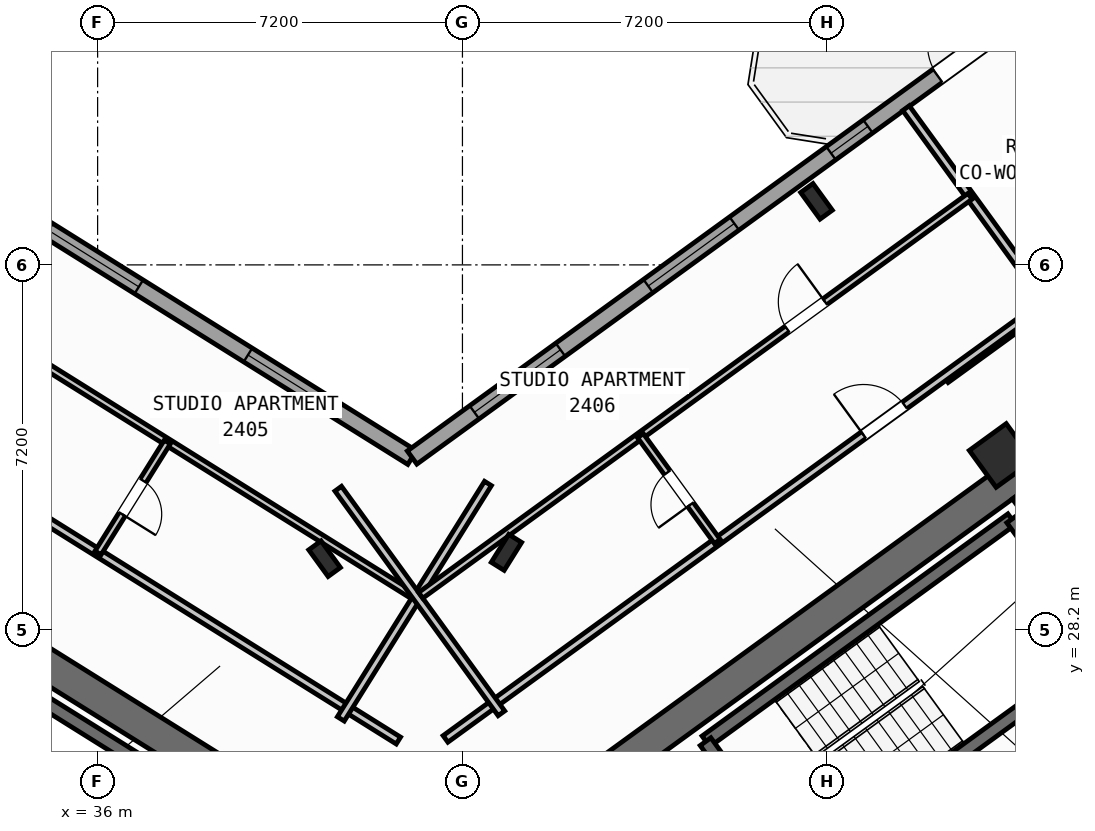
"""IFC4 building model, lengths in metres.
Left out: names, types, materials, properties, quantities, classifications, styles, units other than length and angle.
Written with IfcOpenShell. Run it as: python <this file> out.ifc"""

import sys

from ifc_helpers import new_model, si_unit, direction, frame, frame_2d, origin, origin_2d, place, context, subcontext, project, spatial, rectangle, hollow_rectangle, i_section, extrude, source, transform, mapped, element, fill, save


model = new_model("IFC4")
c1 = context("Model", 3, precision=1e-05, world=origin(), true_north=direction((0.0, 1.0)))
c2 = subcontext(c1, "Body", "Model", "MODEL_VIEW")
j1 = project(units=[si_unit("LENGTHUNIT", "METRE"), si_unit("PLANEANGLEUNIT", "RADIAN")], contexts=[c1])
p1 = place(None, origin())
s1 = spatial("IfcSite", under=j1, at=p1, CompositionType="ELEMENT")
p2 = place(p1, origin())
s2 = spatial("IfcBuilding", under=s1, at=p2, CompositionType="ELEMENT")
p3 = place(p2, frame((0.0, 0.0, 97.2)))
s3 = spatial("IfcBuildingStorey", under=s2, at=p3, CompositionType="ELEMENT", Elevation=97.2)
p4 = place(p3, frame((40.615, 23.983, 0.0), z_axis=(0.0, 0.0, 1.0), x_axis=(-0.848045953968, 0.529922692436, 0.0)))
e1 = element("IfcWall", 1, at=p4, inside=s3, PredefinedType="SHEAR", context=c2, shape_type="SweptSolid", body=[
    extrude(rectangle(XDim=13.24, YDim=0.65, at=frame_2d((6.62, 0.0))), origin(), (0.0, 0.0, 1.0), 3.32),
])
p5 = place(p3, frame((44.325, 24.113, 0.0), z_axis=(0.0, 0.0, 1.0), x_axis=(0.809012664862, 0.58779121131, 0.0)))
e2 = element("IfcWall", 2, at=p5, inside=s3, PredefinedType="SHEAR", context=c2, shape_type="SweptSolid", body=[
    extrude(rectangle(XDim=12.44, YDim=0.65, at=frame_2d((6.22, 0.0))), origin(), (0.0, 0.0, 1.0), 3.32),
])
p6 = place(p3, frame((58.064, 25.813, 0.0), z_axis=(0.0, 0.0, 1.0), x_axis=(-0.58777996584, 0.809020835181, 0.0)))
e3 = element("IfcWall", 3, at=p6, inside=s3, PredefinedType="SHEAR", context=c2, shape_type="SweptSolid", body=[
    extrude(rectangle(XDim=6.375, YDim=0.65, at=frame_2d((3.188, 0.0))), origin(), (0.0, 0.0, 1.0), 3.32),
])
m1 = source(origin(), c2, "Body", "SweptSolid", [
    extrude(i_section(OverallWidth=0.3, OverallDepth=0.65, WebThickness=0.016, FlangeThickness=0.031, at=origin_2d()), origin(), (0.0, 0.0, 1.0), 3.6),
])
for number, where, z_axis, x_axis in (
    (4, (44.068, 29.726, 0.0), (0.0, 0.0, 1.0), (-0.848, 0.53, 0.0)),
    (5, (40.479, 29.601, 0.0), (0.0, 0.0, 1.0), (0.809, 0.588, 0.0)),
):
    element("IfcColumn", number, at=place(p3, frame(where, z_axis=z_axis, x_axis=x_axis)), inside=s3, PredefinedType="COLUMN", context=c2, shape_type="MappedRepresentation", body=[
        mapped(m1, transform((0.0, 0.0, 0.0), scale=1.0)),
    ])
m2 = source(origin(), c2, "Body", "SweptSolid", [
    extrude(hollow_rectangle(XDim=0.9, YDim=0.9, WallThickness=0.036, at=origin_2d()), origin(), (0.0, 0.0, 1.0), 3.6),
])
p7 = place(p3, frame((53.832, 31.638, 0.0), z_axis=(0.0, 0.0, 1.0), x_axis=(0.809016994375, 0.587785252292, 0.0)))
e6 = element("IfcColumn", 6, at=p7, inside=s3, PredefinedType="COLUMN", context=c2, shape_type="MappedRepresentation", body=[
    mapped(m2, transform((0.0, 0.0, 0.0), scale=1.0)),
])
p8 = place(p3, frame((50.188, 36.654, 0.0), z_axis=(0.0, 0.0, 1.0), x_axis=(0.809016994375, 0.587785252292, 0.0)))
e7 = element("IfcColumn", 7, at=p8, inside=s3, PredefinedType="COLUMN", context=c2, shape_type="MappedRepresentation", body=[
    mapped(m1, transform((0.0, 0.0, 0.0), scale=1.0)),
])
p9 = place(p3, frame((17.424, 47.083, 0.0), z_axis=(0.0, 0.0, 1.0), x_axis=(0.848049927979, -0.529916332693, 0.0)))
e8 = element("IfcWall", 8, at=p9, inside=s3, PredefinedType="STANDARD", context=c2, shape_type="SweptSolid", body=[
    extrude(rectangle(XDim=29.223, YDim=0.32, at=frame_2d((14.612, 0.0))), origin(), (0.0, 0.0, 1.0), 3.32),
])
p10 = place(p9, frame((3.745, 0.0, 0.0)))
e9 = element("IfcOpeningElement", 9, at=p10, cuts=e8, PredefinedType="OPENING", context=c2, shape_type="SweptSolid", body=[
    extrude(rectangle(XDim=1.05, YDim=2.15, at=frame_2d((0.525, 1.075))), frame((0.0, 0.17, 0.0), z_axis=(0.0, -1.0, 0.0), x_axis=(1.0, 0.0, 0.0)), (0.0, 0.0, 1.0), 0.34),
])
p11 = place(p9, frame((0.699, 0.0, 0.95)))
e10 = element("IfcOpeningElement", 10, at=p11, cuts=e8, PredefinedType="OPENING", context=c2, shape_type="SweptSolid", body=[
    extrude(rectangle(XDim=1.2, YDim=1.4, at=frame_2d((0.6, 0.7))), frame((0.0, 0.17, 0.0), z_axis=(0.0, -1.0, 0.0), x_axis=(1.0, 0.0, 0.0)), (0.0, 0.0, 1.0), 0.34),
])
p12 = place(p9, frame((6.951, 0.0, 1.0)))
e11 = element("IfcOpeningElement", 11, at=p12, cuts=e8, PredefinedType="OPENING", context=c2, shape_type="SweptSolid", body=[
    extrude(rectangle(XDim=0.9, YDim=1.25, at=frame_2d((0.45, 0.625))), frame((0.0, 0.17, 0.0), z_axis=(0.0, -1.0, 0.0), x_axis=(1.0, 0.0, 0.0)), (0.0, 0.0, 1.0), 0.34),
])
p13 = place(p9, frame((9.841, 0.0, 0.85)))
e12 = element("IfcOpeningElement", 12, at=p13, cuts=e8, PredefinedType="OPENING", context=c2, shape_type="SweptSolid", body=[
    extrude(rectangle(XDim=1.5, YDim=1.5, at=frame_2d((0.75, 0.75))), frame((0.0, 0.17, 0.0), z_axis=(0.0, -1.0, 0.0), x_axis=(1.0, 0.0, 0.0)), (0.0, 0.0, 1.0), 0.34),
])
p14 = place(p9, frame((13.889, 0.0, 0.95)))
e13 = element("IfcOpeningElement", 13, at=p14, cuts=e8, PredefinedType="OPENING", context=c2, shape_type="SweptSolid", body=[
    extrude(rectangle(XDim=1.2, YDim=1.4, at=frame_2d((0.6, 0.7))), frame((0.0, 0.17, 0.0), z_axis=(0.0, -1.0, 0.0), x_axis=(1.0, 0.0, 0.0)), (0.0, 0.0, 1.0), 0.34),
])
p15 = place(p9, frame((17.254, 0.0, 1.0)))
e14 = element("IfcOpeningElement", 14, at=p15, cuts=e8, PredefinedType="OPENING", context=c2, shape_type="SweptSolid", body=[
    extrude(rectangle(XDim=0.9, YDim=1.25, at=frame_2d((0.45, 0.625))), frame((0.0, 0.17, 0.0), z_axis=(0.0, -1.0, 0.0), x_axis=(1.0, 0.0, 0.0)), (0.0, 0.0, 1.0), 0.34),
])
p16 = place(p9, frame((20.764, 0.0, 0.8)))
e15 = element("IfcOpeningElement", 15, at=p16, cuts=e8, PredefinedType="OPENING", context=c2, shape_type="SweptSolid", body=[
    extrude(rectangle(XDim=2.1, YDim=1.55, at=frame_2d((1.05, 0.775))), frame((0.0, 0.17, 0.0), z_axis=(0.0, -1.0, 0.0), x_axis=(1.0, 0.0, 0.0)), (0.0, 0.0, 1.0), 0.34),
])
p17 = place(p9, frame((25.403, 0.0, 0.8)))
e16 = element("IfcOpeningElement", 16, at=p17, cuts=e8, PredefinedType="OPENING", context=c2, shape_type="SweptSolid", body=[
    extrude(rectangle(XDim=2.1, YDim=1.55, at=frame_2d((1.05, 0.775))), frame((0.0, 0.17, 0.0), z_axis=(0.0, -1.0, 0.0), x_axis=(1.0, 0.0, 0.0)), (0.0, 0.0, 1.0), 0.34),
])
p18 = place(p3, frame((42.207, 31.597, 0.0), z_axis=(0.0, 0.0, 1.0), x_axis=(0.809020333377, 0.587780656523, 0.0)))
e17 = element("IfcWall", 17, at=p18, inside=s3, PredefinedType="STANDARD", context=c2, shape_type="SweptSolid", body=[
    extrude(rectangle(XDim=15.223, YDim=0.32, at=frame_2d((7.611, 0.0))), origin(), (0.0, 0.0, 1.0), 3.32),
])
p19 = place(p18, frame((12.82, 0.0, 0.0)))
e18 = element("IfcOpeningElement", 18, at=p19, cuts=e17, PredefinedType="OPENING", context=c2, shape_type="SweptSolid", body=[
    extrude(rectangle(XDim=1.05, YDim=2.15, at=frame_2d((0.525, 1.075))), frame((0.0, 0.17, 0.0), z_axis=(0.0, -1.0, 0.0), x_axis=(1.0, 0.0, 0.0)), (0.0, 0.0, 1.0), 0.34),
])
p20 = place(p18, frame((1.52, 0.0, 0.8)))
e19 = element("IfcOpeningElement", 19, at=p20, cuts=e17, PredefinedType="OPENING", context=c2, shape_type="SweptSolid", body=[
    extrude(rectangle(XDim=2.1, YDim=1.55, at=frame_2d((1.05, 0.775))), frame((0.0, 0.17, 0.0), z_axis=(0.0, -1.0, 0.0), x_axis=(1.0, 0.0, 0.0)), (0.0, 0.0, 1.0), 0.34),
])
p21 = place(p18, frame((5.76, 0.0, 0.8)))
e20 = element("IfcOpeningElement", 20, at=p21, cuts=e17, PredefinedType="OPENING", context=c2, shape_type="SweptSolid", body=[
    extrude(rectangle(XDim=2.1, YDim=1.55, at=frame_2d((1.05, 0.775))), frame((0.0, 0.17, 0.0), z_axis=(0.0, -1.0, 0.0), x_axis=(1.0, 0.0, 0.0)), (0.0, 0.0, 1.0), 0.34),
])
p22 = place(p18, frame((10.219, 0.0, 1.0)))
e21 = element("IfcOpeningElement", 21, at=p22, cuts=e17, PredefinedType="OPENING", context=c2, shape_type="SweptSolid", body=[
    extrude(rectangle(XDim=0.9, YDim=1.25, at=frame_2d((0.45, 0.625))), frame((0.0, 0.17, 0.0), z_axis=(0.0, -1.0, 0.0), x_axis=(1.0, 0.0, 0.0)), (0.0, 0.0, 1.0), 0.34),
])
p23 = place(p3, frame((39.721, 23.788, 0.0), z_axis=(0.0, 0.0, 1.0), x_axis=(-0.848054434086, 0.529909121291, 0.0)))
e22 = element("IfcWall", 22, at=p23, inside=s3, PredefinedType="SHEAR", context=c2, shape_type="SweptSolid", body=[
    extrude(rectangle(XDim=7.33, YDim=0.26, at=frame_2d((3.665, 0.0))), origin(), (0.0, 0.0, 1.0), 3.32),
])
p24 = place(p3, frame((48.006, 25.996, 0.0), z_axis=(0.0, 0.0, 1.0), x_axis=(0.80901903764, 0.587782439969, 0.0)))
e23 = element("IfcWall", 23, at=p24, inside=s3, PredefinedType="SHEAR", context=c2, shape_type="SweptSolid", body=[
    extrude(rectangle(XDim=7.46, YDim=0.26, at=frame_2d((3.73, 0.0))), origin(), (0.0, 0.0, 1.0), 3.32),
])
p25 = place(p3, frame((49.863, 23.44, 0.0), z_axis=(0.0, 0.0, 1.0), x_axis=(0.809003474932, 0.587803859759, 0.0)))
e24 = element("IfcWall", 24, at=p25, inside=s3, PredefinedType="SHEAR", context=c2, shape_type="SweptSolid", body=[
    extrude(rectangle(XDim=7.46, YDim=0.26, at=frame_2d((3.73, 0.0))), origin(), (0.0, 0.0, 1.0), 3.32),
])
p26 = place(p25, frame((0.36, 0.0, 0.0)))
e25 = element("IfcOpeningElement", 25, at=p26, cuts=e24, PredefinedType="OPENING", context=c2, shape_type="SweptSolid", body=[
    extrude(rectangle(XDim=0.86, YDim=2.05, at=frame_2d((0.43, 1.025))), frame((0.0, 0.14, 0.0), z_axis=(0.0, -1.0, 0.0), x_axis=(1.0, 0.0, 0.0)), (0.0, 0.0, 1.0), 0.28),
])
p27 = place(p3, frame((49.855, 23.434, 0.0), z_axis=(0.0, 0.0, 1.0), x_axis=(-0.58776738483, 0.809029975545, 0.0)))
e26 = element("IfcWall", 26, at=p27, inside=s3, PredefinedType="SHEAR", context=c2, shape_type="SweptSolid", body=[
    extrude(rectangle(XDim=3.16, YDim=0.26, at=frame_2d((1.58, 0.0))), origin(), (0.0, 0.0, 1.0), 3.32),
])
p28 = place(p3, frame((55.906, 27.831, 0.0), z_axis=(0.0, 0.0, 1.0), x_axis=(-0.587804123638, 0.809003283204, 0.0)))
e27 = element("IfcWall", 27, at=p28, inside=s3, PredefinedType="SHEAR", context=c2, shape_type="SweptSolid", body=[
    extrude(rectangle(XDim=3.16, YDim=0.26, at=frame_2d((1.58, 0.0))), origin(), (0.0, 0.0, 1.0), 3.32),
])
p29 = place(p3, frame((41.936, 26.012, 0.0), z_axis=(0.0, 0.0, 1.0), x_axis=(-0.848051154596, 0.529914369676, 0.0)))
e28 = element("IfcWall", 28, at=p29, inside=s3, PredefinedType="PARTITIONING", context=c2, shape_type="SweptSolid", body=[
    extrude(rectangle(XDim=15.57, YDim=0.16, at=frame_2d((7.785, 0.0))), origin(), (0.0, 0.0, 1.0), 3.31),
])
p30 = place(p29, frame((10.83, 0.0, 0.0)))
e29 = element("IfcOpeningElement", 29, at=p30, cuts=e28, PredefinedType="OPENING", context=c2, shape_type="SweptSolid", body=[
    extrude(rectangle(XDim=1.0, YDim=2.1, at=frame_2d((0.5, 1.05))), frame((0.0, 0.09, 0.0), z_axis=(0.0, -1.0, 0.0), x_axis=(1.0, 0.0, 0.0)), (0.0, 0.0, 1.0), 0.18),
])
p31 = place(p3, frame((43.704, 31.086, 0.0), z_axis=(0.0, 0.0, 1.0), x_axis=(-0.529906828443, -0.848055866774, 0.0)))
e30 = element("IfcWall", 30, at=p31, inside=s3, PredefinedType="PARTITIONING", context=c2, shape_type="SweptSolid", body=[
    extrude(rectangle(XDim=5.48, YDim=0.16, at=frame_2d((2.74, 0.0))), origin(), (0.0, 0.0, 1.0), 3.31),
])
p32 = place(p3, frame((42.226, 28.873, 0.0), z_axis=(0.0, 0.0, 1.0), x_axis=(-0.848049134363, 0.529917602752, 0.0)))
e31 = element("IfcWall", 31, at=p32, inside=s3, PredefinedType="PLUMBINGWALL", context=c2, shape_type="SweptSolid", body=[
    extrude(rectangle(XDim=14.3, YDim=0.14, at=frame_2d((7.15, 0.0))), origin(), (0.0, 0.0, 1.0), 3.31),
])
p33 = place(p32, frame((9.57, 0.0, 0.0)))
e32 = element("IfcOpeningElement", 32, at=p33, cuts=e31, PredefinedType="OPENING", context=c2, shape_type="SweptSolid", body=[
    extrude(rectangle(XDim=0.92, YDim=2.08, at=frame_2d((0.46, 1.04))), frame((0.0, 0.08, 0.0), z_axis=(0.0, -1.0, 0.0), x_axis=(1.0, 0.0, 0.0)), (0.0, 0.0, 1.0), 0.16),
])
p34 = place(p3, frame((37.375, 31.904, 0.0), z_axis=(0.0, 0.0, 1.0), x_axis=(-0.529913878929, -0.848051461244, 0.0)))
e33 = element("IfcWall", 33, at=p34, inside=s3, PredefinedType="PLUMBINGWALL", context=c2, shape_type="SweptSolid", body=[
    extrude(rectangle(XDim=2.58, YDim=0.14, at=frame_2d((1.29, 0.0))), origin(), (0.0, 0.0, 1.0), 3.31),
])
p35 = place(p34, frame((0.9, 0.0, 0.0)))
e34 = element("IfcOpeningElement", 34, at=p35, cuts=e33, PredefinedType="OPENING", context=c2, shape_type="SweptSolid", body=[
    extrude(rectangle(XDim=0.78, YDim=2.05, at=frame_2d((0.39, 1.025))), frame((0.0, 0.08, 0.0), z_axis=(0.0, -1.0, 0.0), x_axis=(1.0, 0.0, 0.0)), (0.0, 0.0, 1.0), 0.16),
])
p36 = place(p3, frame((52.739, 33.143, 0.0), z_axis=(0.0, 0.0, 1.0), x_axis=(0.809000999347, 0.58780726693, 0.0)))
e35 = element("IfcWall", 35, at=p36, inside=s3, PredefinedType="PARTITIONING", context=c2, shape_type="SweptSolid", body=[
    extrude(rectangle(XDim=2.51, YDim=0.16, at=frame_2d((1.255, 0.0))), origin(), (0.0, 0.0, 1.0), 3.31),
])
p37 = place(p3, frame((60.829, 26.278, 0.0), z_axis=(0.0, 0.0, 1.0), x_axis=(-0.587777474174, 0.809022645451, 0.0)))
e36 = element("IfcWall", 36, at=p37, inside=s3, PredefinedType="PARTITIONING", context=c2, shape_type="SweptSolid", body=[
    extrude(rectangle(XDim=15.1, YDim=0.16, at=frame_2d((7.55, 0.0))), origin(), (0.0, 0.0, 1.0), 3.31),
])
p38 = place(p3, frame((42.866, 26.044, 0.0), z_axis=(0.0, 0.0, 1.0), x_axis=(0.809020254154, 0.587780765566, 0.0)))
e37 = element("IfcWall", 37, at=p38, inside=s3, PredefinedType="PARTITIONING", context=c2, shape_type="SweptSolid", body=[
    extrude(rectangle(XDim=14.67, YDim=0.16, at=frame_2d((7.335, 0.0))), origin(), (0.0, 0.0, 1.0), 3.31),
])
p39 = place(p38, frame((10.2, 0.0, 0.0)))
e38 = element("IfcOpeningElement", 38, at=p39, cuts=e37, PredefinedType="OPENING", context=c2, shape_type="SweptSolid", body=[
    extrude(rectangle(XDim=1.0, YDim=2.1, at=frame_2d((0.5, 1.05))), frame((0.0, 0.09, 0.0), z_axis=(0.0, -1.0, 0.0), x_axis=(1.0, 0.0, 0.0)), (0.0, 0.0, 1.0), 0.18),
])
p40 = place(p3, frame((43.969, 26.55, 0.0), z_axis=(0.0, 0.0, 1.0), x_axis=(-0.587776919386, 0.80902304852, 0.0)))
e39 = element("IfcWall", 39, at=p40, inside=s3, PredefinedType="PARTITIONING", context=c2, shape_type="SweptSolid", body=[
    extrude(rectangle(XDim=5.48, YDim=0.16, at=frame_2d((2.74, 0.0))), origin(), (0.0, 0.0, 1.0), 3.31),
])
p41 = place(p3, frame((42.377, 28.878, 0.0), z_axis=(0.0, 0.0, 1.0), x_axis=(0.809020411523, 0.587780548963, 0.0)))
e40 = element("IfcWall", 40, at=p41, inside=s3, PredefinedType="PLUMBINGWALL", context=c2, shape_type="SweptSolid", body=[
    extrude(rectangle(XDim=13.4, YDim=0.14, at=frame_2d((6.7, 0.0))), origin(), (0.0, 0.0, 1.0), 3.31),
])
p42 = place(p41, frame((8.94, 0.0, 0.0)))
e41 = element("IfcOpeningElement", 41, at=p42, cuts=e40, PredefinedType="OPENING", context=c2, shape_type="SweptSolid", body=[
    extrude(rectangle(XDim=0.92, YDim=2.08, at=frame_2d((0.46, 1.04))), frame((0.0, 0.08, 0.0), z_axis=(0.0, -1.0, 0.0), x_axis=(1.0, 0.0, 0.0)), (0.0, 0.0, 1.0), 0.16),
])
p43 = place(p3, frame((48.229, 29.941, 0.0), z_axis=(0.0, 0.0, 1.0), x_axis=(-0.587772116736, 0.809026537752, 0.0)))
e42 = element("IfcWall", 42, at=p43, inside=s3, PredefinedType="PLUMBINGWALL", context=c2, shape_type="SweptSolid", body=[
    extrude(rectangle(XDim=2.58, YDim=0.14, at=frame_2d((1.29, 0.0))), origin(), (0.0, 0.0, 1.0), 3.31),
])
p44 = place(p43, frame((0.9, 0.0, 0.0)))
e43 = element("IfcOpeningElement", 43, at=p44, cuts=e42, PredefinedType="OPENING", context=c2, shape_type="SweptSolid", body=[
    extrude(rectangle(XDim=0.78, YDim=2.05, at=frame_2d((0.39, 1.025))), frame((0.0, 0.08, 0.0), z_axis=(0.0, -1.0, 0.0), x_axis=(1.0, 0.0, 0.0)), (0.0, 0.0, 1.0), 0.16),
])
m3 = source(origin(), c2, "Body", "SweptSolid", [
    extrude(rectangle(XDim=1.05, YDim=2.15, at=frame_2d((0.525, 1.075))), frame((0.0, 0.025, 0.0), z_axis=(0.0, -1.0, 0.0), x_axis=(1.0, 0.0, 0.0)), (0.0, 0.0, 1.0), 0.05),
])
p45 = place(p19, origin())
e44 = element("IfcDoor", 44, at=p45, inside=s3, OperationType="SINGLE_SWING_RIGHT", PredefinedType="DOOR", context=c2, shape_type="MappedRepresentation", body=[
    mapped(m3, transform((0.0, 0.0, 0.0), scale=1.0)),
])
fill(e18, e44)
m4 = source(origin(), c2, "Body", "SweptSolid", [
    extrude(rectangle(XDim=2.1, YDim=1.55, at=frame_2d((1.05, 0.775))), frame((0.0, 0.03, 0.0), z_axis=(0.0, -1.0, 0.0), x_axis=(1.0, 0.0, 0.0)), (0.0, 0.0, 1.0), 0.06),
])
p46 = place(p16, origin())
e45 = element("IfcWindow", 45, at=p46, inside=s3, PartitioningType="SINGLE_PANEL", PredefinedType="WINDOW", context=c2, shape_type="MappedRepresentation", body=[
    mapped(m4, transform((0.0, 0.0, 0.0), scale=1.0)),
])
fill(e15, e45)
p47 = place(p17, origin())
e46 = element("IfcWindow", 46, at=p47, inside=s3, PartitioningType="SINGLE_PANEL", PredefinedType="WINDOW", context=c2, shape_type="MappedRepresentation", body=[
    mapped(m4, transform((0.0, 0.0, 0.0), scale=1.0)),
])
fill(e16, e46)
p48 = place(p20, origin())
e47 = element("IfcWindow", 47, at=p48, inside=s3, PartitioningType="SINGLE_PANEL", PredefinedType="WINDOW", context=c2, shape_type="MappedRepresentation", body=[
    mapped(m4, transform((0.0, 0.0, 0.0), scale=1.0)),
])
fill(e19, e47)
p49 = place(p21, origin())
e48 = element("IfcWindow", 48, at=p49, inside=s3, PartitioningType="SINGLE_PANEL", PredefinedType="WINDOW", context=c2, shape_type="MappedRepresentation", body=[
    mapped(m4, transform((0.0, 0.0, 0.0), scale=1.0)),
])
fill(e20, e48)
m5 = source(origin(), c2, "Body", "SweptSolid", [
    extrude(rectangle(XDim=0.9, YDim=1.25, at=frame_2d((0.45, 0.625))), frame((0.0, 0.03, 0.0), z_axis=(0.0, -1.0, 0.0), x_axis=(1.0, 0.0, 0.0)), (0.0, 0.0, 1.0), 0.06),
])
p50 = place(p22, origin())
e49 = element("IfcWindow", 49, at=p50, inside=s3, PartitioningType="SINGLE_PANEL", PredefinedType="WINDOW", context=c2, shape_type="MappedRepresentation", body=[
    mapped(m5, transform((0.0, 0.0, 0.0), scale=1.0)),
])
fill(e21, e49)
m6 = source(origin(), c2, "Body", "SweptSolid", [
    extrude(rectangle(XDim=0.78, YDim=2.05, at=frame_2d((0.39, 1.025))), frame((0.0, 0.025, 0.0), z_axis=(0.0, -1.0, 0.0), x_axis=(1.0, 0.0, 0.0)), (0.0, 0.0, 1.0), 0.05),
])
p51 = place(p35, origin())
e50 = element("IfcDoor", 50, at=p51, inside=s3, OperationType="SINGLE_SWING_RIGHT", PredefinedType="DOOR", context=c2, shape_type="MappedRepresentation", body=[
    mapped(m6, transform((0.0, 0.0, 0.0), scale=1.0)),
])
fill(e34, e50)
m7 = source(origin(), c2, "Body", "SweptSolid", [
    extrude(rectangle(XDim=1.0, YDim=2.1, at=frame_2d((0.5, 1.05))), frame((0.0, 0.025, 0.0), z_axis=(0.0, -1.0, 0.0), x_axis=(1.0, 0.0, 0.0)), (0.0, 0.0, 1.0), 0.05),
])
p52 = place(p39, origin())
e51 = element("IfcDoor", 51, at=p52, inside=s3, OperationType="SINGLE_SWING_LEFT", PredefinedType="DOOR", context=c2, shape_type="MappedRepresentation", body=[
    mapped(m7, transform((0.0, 0.0, 0.0), scale=1.0)),
])
fill(e38, e51)
m8 = source(origin(), c2, "Body", "SweptSolid", [
    extrude(rectangle(XDim=0.92, YDim=2.08, at=frame_2d((0.46, 1.04))), frame((0.0, 0.025, 0.0), z_axis=(0.0, -1.0, 0.0), x_axis=(1.0, 0.0, 0.0)), (0.0, 0.0, 1.0), 0.05),
])
p53 = place(p42, origin())
e52 = element("IfcDoor", 52, at=p53, inside=s3, OperationType="SINGLE_SWING_RIGHT", PredefinedType="DOOR", context=c2, shape_type="MappedRepresentation", body=[
    mapped(m8, transform((0.0, 0.0, 0.0), scale=1.0)),
])
fill(e41, e52)
p54 = place(p44, origin())
e53 = element("IfcDoor", 53, at=p54, inside=s3, OperationType="SINGLE_SWING_LEFT", PredefinedType="DOOR", context=c2, shape_type="MappedRepresentation", body=[
    mapped(m6, transform((0.0, 0.0, 0.0), scale=1.0)),
])
fill(e43, e53)
save(model, sys.argv[1])
